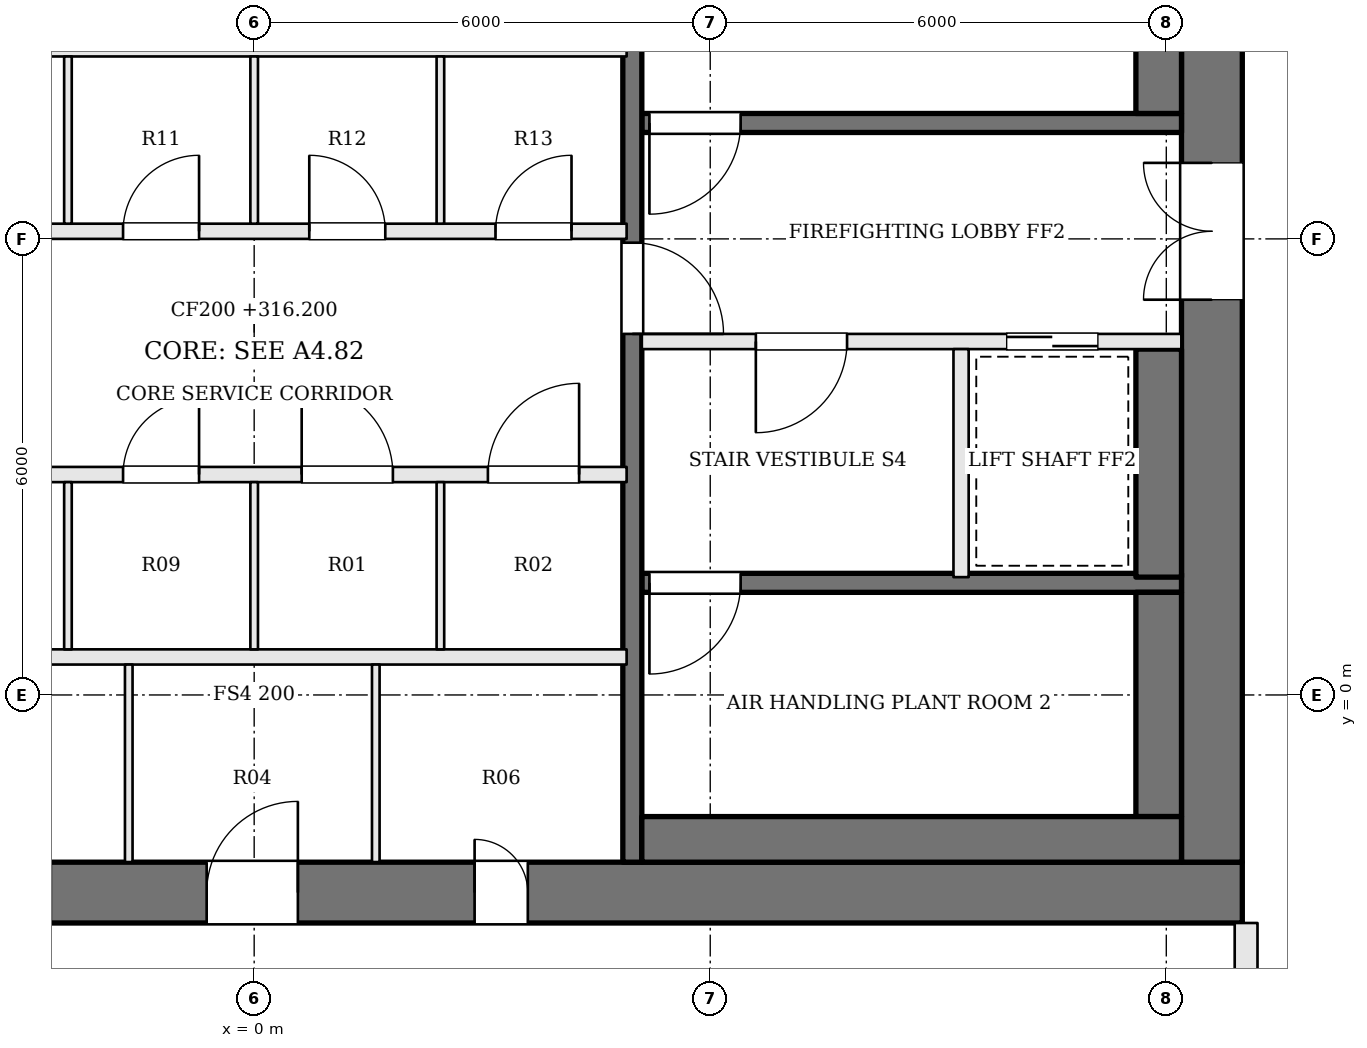
"""IFC4 building model, lengths in metres.
Left out: names, types, materials, properties, quantities, classifications, styles, units other than length and angle.
Written with IfcOpenShell. Run it as: python <this file> out.ifc"""

import sys

from ifc_helpers import new_model, si_unit, direction, frame, frame_2d, origin, place, context, subcontext, project, spatial, rectangle, extrude, element, fill, save


model = new_model("IFC4")
c1 = context("Model", 3, precision=1e-05, world=origin(), true_north=direction((0.0, 1.0)))
c2 = subcontext(c1, "Body", "Model", "MODEL_VIEW")
j1 = project(units=[si_unit("LENGTHUNIT", "METRE"), si_unit("PLANEANGLEUNIT", "RADIAN")], contexts=[c1])
p1 = place(None, origin())
s1 = spatial("IfcSite", under=j1, at=p1, CompositionType="ELEMENT")
p2 = place(p1, origin())
s2 = spatial("IfcBuilding", under=s1, at=p2, CompositionType="ELEMENT")
p3 = place(p2, frame((0.0, 0.0, 316.2)))
s3 = spatial("IfcBuildingStorey", under=s2, at=p3, CompositionType="ELEMENT", Elevation=316.2)
p4 = place(p3, frame((-13.0, -2.6, 0.0), z_axis=(0.0, 0.0, 1.0), x_axis=(1.0, 0.0, 0.0)))
e1 = element("IfcWall", 1, at=p4, inside=s3, PredefinedType="SHEAR", context=c2, shape_type="SweptSolid", body=[
    extrude(rectangle(XDim=26.0, YDim=0.8, at=frame_2d((13.0, 0.0))), origin(), (0.0, 0.0, 1.0), 4.0),
])
p5 = place(p4, frame((9.125, 0.0, 0.0)))
e2 = element("IfcOpeningElement", 2, at=p5, cuts=e1, PredefinedType="OPENING", context=c2, shape_type="SweptSolid", body=[
    extrude(rectangle(XDim=1.2, YDim=2.1, at=frame_2d((0.6, 1.05))), frame((0.0, 0.41, 0.0), z_axis=(0.0, -1.0, 0.0), x_axis=(1.0, 0.0, 0.0)), (0.0, 0.0, 1.0), 0.82),
])
p6 = place(p4, frame((12.375, 0.0, 0.0)))
e3 = element("IfcOpeningElement", 3, at=p6, cuts=e1, PredefinedType="OPENING", context=c2, shape_type="SweptSolid", body=[
    extrude(rectangle(XDim=1.2, YDim=2.1, at=frame_2d((0.6, 1.05))), frame((0.0, 0.41, 0.0), z_axis=(0.0, -1.0, 0.0), x_axis=(1.0, 0.0, 0.0)), (0.0, 0.0, 1.0), 0.82),
])
p7 = place(p4, frame((15.9, 0.0, 0.0)))
e4 = element("IfcOpeningElement", 4, at=p7, cuts=e1, PredefinedType="OPENING", context=c2, shape_type="SweptSolid", body=[
    extrude(rectangle(XDim=0.7, YDim=2.1, at=frame_2d((0.35, 1.05))), frame((0.0, 0.41, 0.0), z_axis=(0.0, -1.0, 0.0), x_axis=(1.0, 0.0, 0.0)), (0.0, 0.0, 1.0), 0.82),
])
p8 = place(p4, frame((6.7, 0.0, 0.0)))
e5 = element("IfcOpeningElement", 5, at=p8, cuts=e1, PredefinedType="OPENING", context=c2, shape_type="SweptSolid", body=[
    extrude(rectangle(XDim=0.9, YDim=2.1, at=frame_2d((0.45, 1.05))), frame((0.0, 0.41, 0.0), z_axis=(0.0, -1.0, 0.0), x_axis=(1.0, 0.0, 0.0)), (0.0, 0.0, 1.0), 0.82),
])
p9 = place(p3, frame((12.6, -2.2, 0.0), z_axis=(0.0, 0.0, 1.0), x_axis=(0.0, 1.0, 0.0)))
e6 = element("IfcWall", 6, at=p9, inside=s3, PredefinedType="SHEAR", context=c2, shape_type="SweptSolid", body=[
    extrude(rectangle(XDim=13.4, YDim=0.8, at=frame_2d((6.7, 0.0))), origin(), (0.0, 0.0, 1.0), 4.0),
])
p10 = place(p9, frame((7.4, 0.0, 0.0)))
e7 = element("IfcOpeningElement", 7, at=p10, cuts=e6, PredefinedType="OPENING", context=c2, shape_type="SweptSolid", body=[
    extrude(rectangle(XDim=1.8, YDim=2.1, at=frame_2d((0.9, 1.05))), frame((0.0, 0.41, 0.0), z_axis=(0.0, -1.0, 0.0), x_axis=(1.0, 0.0, 0.0)), (0.0, 0.0, 1.0), 0.82),
])
p11 = place(p3, frame((12.2, 7.525, 0.0), z_axis=(0.0, 0.0, 1.0), x_axis=(-1.0, 0.0, 0.0)))
e8 = element("IfcWall", 8, at=p11, inside=s3, PredefinedType="SOLIDWALL", context=c2, shape_type="SweptSolid", body=[
    extrude(rectangle(XDim=7.1, YDim=0.25, at=frame_2d((3.55, 0.0))), origin(), (0.0, 0.0, 1.0), 3.28),
])
p12 = place(p11, frame((5.8, 0.0, 0.0)))
e9 = element("IfcOpeningElement", 9, at=p12, cuts=e8, PredefinedType="OPENING", context=c2, shape_type="SweptSolid", body=[
    extrude(rectangle(XDim=1.2, YDim=2.1, at=frame_2d((0.6, 1.05))), frame((0.0, 0.135, 0.0), z_axis=(0.0, -1.0, 0.0), x_axis=(1.0, 0.0, 0.0)), (0.0, 0.0, 1.0), 0.27),
])
p13 = place(p3, frame((12.2, 4.65, 0.0), z_axis=(0.0, 0.0, 1.0), x_axis=(-1.0, 0.0, 0.0)))
e10 = element("IfcWall", 10, at=p13, inside=s3, PredefinedType="SOLIDWALL", context=c2, shape_type="SweptSolid", body=[
    extrude(rectangle(XDim=7.1, YDim=0.2, at=frame_2d((3.55, 0.0))), origin(), (0.0, 0.0, 1.0), 3.28),
])
p14 = place(p13, frame((4.4, 0.0, 0.0)))
e11 = element("IfcOpeningElement", 11, at=p14, cuts=e10, PredefinedType="OPENING", context=c2, shape_type="SweptSolid", body=[
    extrude(rectangle(XDim=1.2, YDim=2.1, at=frame_2d((0.6, 1.05))), frame((0.0, 0.11, 0.0), z_axis=(0.0, -1.0, 0.0), x_axis=(1.0, 0.0, 0.0)), (0.0, 0.0, 1.0), 0.22),
])
p15 = place(p13, frame((1.1, 0.0, 0.0)))
e12 = element("IfcOpeningElement", 12, at=p15, cuts=e10, PredefinedType="OPENING", context=c2, shape_type="SweptSolid", body=[
    extrude(rectangle(XDim=1.2, YDim=2.1, at=frame_2d((0.6, 1.05))), frame((0.0, 0.11, 0.0), z_axis=(0.0, -1.0, 0.0), x_axis=(1.0, 0.0, 0.0)), (0.0, 0.0, 1.0), 0.22),
])
p16 = place(p3, frame((12.2, 1.475, 0.0), z_axis=(0.0, 0.0, 1.0), x_axis=(-1.0, 0.0, 0.0)))
e13 = element("IfcWall", 13, at=p16, inside=s3, PredefinedType="SOLIDWALL", context=c2, shape_type="SweptSolid", body=[
    extrude(rectangle(XDim=7.1, YDim=0.25, at=frame_2d((3.55, 0.0))), origin(), (0.0, 0.0, 1.0), 3.28),
])
p17 = place(p16, frame((5.8, 0.0, 0.0)))
e14 = element("IfcOpeningElement", 14, at=p17, cuts=e13, PredefinedType="OPENING", context=c2, shape_type="SweptSolid", body=[
    extrude(rectangle(XDim=1.2, YDim=2.1, at=frame_2d((0.6, 1.05))), frame((0.0, 0.135, 0.0), z_axis=(0.0, -1.0, 0.0), x_axis=(1.0, 0.0, 0.0)), (0.0, 0.0, 1.0), 0.27),
])
p18 = place(p3, frame((9.3, 4.55, 0.0), z_axis=(0.0, 0.0, 1.0), x_axis=(0.0, -1.0, 0.0)))
e15 = element("IfcWall", 15, at=p18, inside=s3, PredefinedType="SOLIDWALL", context=c2, shape_type="SweptSolid", body=[
    extrude(rectangle(XDim=3.0, YDim=0.2, at=frame_2d((1.5, 0.0))), origin(), (0.0, 0.0, 1.0), 3.28),
])
p19 = place(p3, frame((4.975, 11.2, 0.0), z_axis=(0.0, 0.0, 1.0), x_axis=(0.0, -1.0, 0.0)))
e16 = element("IfcWall", 16, at=p19, inside=s3, PredefinedType="SOLIDWALL", context=c2, shape_type="SweptSolid", body=[
    extrude(rectangle(XDim=13.4, YDim=0.25, at=frame_2d((6.7, 0.0))), origin(), (0.0, 0.0, 1.0), 3.28),
])
p20 = place(p19, frame((5.25, 0.0, 0.0)))
e17 = element("IfcOpeningElement", 17, at=p20, cuts=e16, PredefinedType="OPENING", context=c2, shape_type="SweptSolid", body=[
    extrude(rectangle(XDim=1.2, YDim=2.1, at=frame_2d((0.6, 1.05))), frame((0.0, 0.135, 0.0), z_axis=(0.0, -1.0, 0.0), x_axis=(1.0, 0.0, 0.0)), (0.0, 0.0, 1.0), 0.27),
])
p21 = place(p3, frame((11.9, 10.6, 0.0), z_axis=(0.0, 0.0, 1.0), x_axis=(0.0, -1.0, 0.0)))
e18 = element("IfcWall", 18, at=p21, inside=s3, PredefinedType="SOLIDWALL", context=c2, shape_type="SweptSolid", body=[
    extrude(rectangle(XDim=2.95, YDim=0.6, at=frame_2d((1.475, 0.0))), origin(), (0.0, 0.0, 1.0), 3.28),
])
p22 = place(p3, frame((11.9, 4.55, 0.0), z_axis=(0.0, 0.0, 1.0), x_axis=(0.0, -1.0, 0.0)))
e19 = element("IfcWall", 19, at=p22, inside=s3, PredefinedType="SOLIDWALL", context=c2, shape_type="SweptSolid", body=[
    extrude(rectangle(XDim=3.0, YDim=0.6, at=frame_2d((1.5, 0.0))), origin(), (0.0, 0.0, 1.0), 3.28),
])
p23 = place(p3, frame((11.9, 1.35, 0.0), z_axis=(0.0, 0.0, 1.0), x_axis=(0.0, -1.0, 0.0)))
e20 = element("IfcWall", 20, at=p23, inside=s3, PredefinedType="SOLIDWALL", context=c2, shape_type="SweptSolid", body=[
    extrude(rectangle(XDim=2.95, YDim=0.6, at=frame_2d((1.475, 0.0))), origin(), (0.0, 0.0, 1.0), 3.28),
])
p24 = place(p3, frame((12.2, -1.9, 0.0), z_axis=(0.0, 0.0, 1.0), x_axis=(-1.0, 0.0, 0.0)))
e21 = element("IfcWall", 21, at=p24, inside=s3, PredefinedType="SOLIDWALL", context=c2, shape_type="SweptSolid", body=[
    extrude(rectangle(XDim=7.1, YDim=0.6, at=frame_2d((3.55, 0.0))), origin(), (0.0, 0.0, 1.0), 3.28),
])
p25 = place(p3, frame((-4.9, 0.5, 0.0), z_axis=(0.0, 0.0, 1.0), x_axis=(1.0, 0.0, 0.0)))
e22 = element("IfcWall", 22, at=p25, inside=s3, PredefinedType="SOLIDWALL", context=c2, shape_type="SweptSolid", body=[
    extrude(rectangle(XDim=9.8, YDim=0.2, at=frame_2d((4.9, 0.0))), origin(), (0.0, 0.0, 1.0), 3.28),
])
p26 = place(p3, frame((-4.9, 2.9, 0.0), z_axis=(0.0, 0.0, 1.0), x_axis=(1.0, 0.0, 0.0)))
e23 = element("IfcWall", 23, at=p26, inside=s3, PredefinedType="SOLIDWALL", context=c2, shape_type="SweptSolid", body=[
    extrude(rectangle(XDim=9.8, YDim=0.2, at=frame_2d((4.9, 0.0))), origin(), (0.0, 0.0, 1.0), 3.28),
])
p27 = place(p26, frame((0.725, 0.0, 0.0)))
e24 = element("IfcOpeningElement", 24, at=p27, cuts=e23, PredefinedType="OPENING", context=c2, shape_type="SweptSolid", body=[
    extrude(rectangle(XDim=1.0, YDim=2.1, at=frame_2d((0.5, 1.05))), frame((0.0, 0.11, 0.0), z_axis=(0.0, -1.0, 0.0), x_axis=(1.0, 0.0, 0.0)), (0.0, 0.0, 1.0), 0.22),
])
p28 = place(p26, frame((3.175, 0.0, 0.0)))
e25 = element("IfcOpeningElement", 25, at=p28, cuts=e23, PredefinedType="OPENING", context=c2, shape_type="SweptSolid", body=[
    extrude(rectangle(XDim=1.0, YDim=2.1, at=frame_2d((0.5, 1.05))), frame((0.0, 0.11, 0.0), z_axis=(0.0, -1.0, 0.0), x_axis=(1.0, 0.0, 0.0)), (0.0, 0.0, 1.0), 0.22),
])
p29 = place(p26, frame((5.525, 0.0, 0.0)))
e26 = element("IfcOpeningElement", 26, at=p29, cuts=e23, PredefinedType="OPENING", context=c2, shape_type="SweptSolid", body=[
    extrude(rectangle(XDim=1.2, YDim=2.1, at=frame_2d((0.6, 1.05))), frame((0.0, 0.11, 0.0), z_axis=(0.0, -1.0, 0.0), x_axis=(1.0, 0.0, 0.0)), (0.0, 0.0, 1.0), 0.22),
])
p30 = place(p26, frame((7.975, 0.0, 0.0)))
e27 = element("IfcOpeningElement", 27, at=p30, cuts=e23, PredefinedType="OPENING", context=c2, shape_type="SweptSolid", body=[
    extrude(rectangle(XDim=1.2, YDim=2.1, at=frame_2d((0.6, 1.05))), frame((0.0, 0.11, 0.0), z_axis=(0.0, -1.0, 0.0), x_axis=(1.0, 0.0, 0.0)), (0.0, 0.0, 1.0), 0.22),
])
p31 = place(p3, frame((-4.9, 6.1, 0.0), z_axis=(0.0, 0.0, 1.0), x_axis=(1.0, 0.0, 0.0)))
e28 = element("IfcWall", 28, at=p31, inside=s3, PredefinedType="SOLIDWALL", context=c2, shape_type="SweptSolid", body=[
    extrude(rectangle(XDim=9.8, YDim=0.2, at=frame_2d((4.9, 0.0))), origin(), (0.0, 0.0, 1.0), 3.28),
])
p32 = place(p31, frame((0.725, 0.0, 0.0)))
e29 = element("IfcOpeningElement", 29, at=p32, cuts=e28, PredefinedType="OPENING", context=c2, shape_type="SweptSolid", body=[
    extrude(rectangle(XDim=1.0, YDim=2.1, at=frame_2d((0.5, 1.05))), frame((0.0, 0.11, 0.0), z_axis=(0.0, -1.0, 0.0), x_axis=(1.0, 0.0, 0.0)), (0.0, 0.0, 1.0), 0.22),
])
p33 = place(p31, frame((3.175, 0.0, 0.0)))
e30 = element("IfcOpeningElement", 30, at=p33, cuts=e28, PredefinedType="OPENING", context=c2, shape_type="SweptSolid", body=[
    extrude(rectangle(XDim=1.0, YDim=2.1, at=frame_2d((0.5, 1.05))), frame((0.0, 0.11, 0.0), z_axis=(0.0, -1.0, 0.0), x_axis=(1.0, 0.0, 0.0)), (0.0, 0.0, 1.0), 0.22),
])
p34 = place(p31, frame((5.625, 0.0, 0.0)))
e31 = element("IfcOpeningElement", 31, at=p34, cuts=e28, PredefinedType="OPENING", context=c2, shape_type="SweptSolid", body=[
    extrude(rectangle(XDim=1.0, YDim=2.1, at=frame_2d((0.5, 1.05))), frame((0.0, 0.11, 0.0), z_axis=(0.0, -1.0, 0.0), x_axis=(1.0, 0.0, 0.0)), (0.0, 0.0, 1.0), 0.22),
])
p35 = place(p31, frame((8.075, 0.0, 0.0)))
e32 = element("IfcOpeningElement", 32, at=p35, cuts=e28, PredefinedType="OPENING", context=c2, shape_type="SweptSolid", body=[
    extrude(rectangle(XDim=1.0, YDim=2.1, at=frame_2d((0.5, 1.05))), frame((0.0, 0.11, 0.0), z_axis=(0.0, -1.0, 0.0), x_axis=(1.0, 0.0, 0.0)), (0.0, 0.0, 1.0), 0.22),
])
p36 = place(p3, frame((-4.9, 8.5, 0.0), z_axis=(0.0, 0.0, 1.0), x_axis=(1.0, 0.0, 0.0)))
e33 = element("IfcWall", 33, at=p36, inside=s3, PredefinedType="SOLIDWALL", context=c2, shape_type="SweptSolid", body=[
    extrude(rectangle(XDim=9.8, YDim=0.2, at=frame_2d((4.9, 0.0))), origin(), (0.0, 0.0, 1.0), 3.28),
])
for number, where, z_axis, x_axis in (
    (34, (-2.45, 0.6, 0.0), (0.0, 0.0, 1.0), (0.0, 1.0, 0.0)),
    (35, (0.0, 0.6, 0.0), (0.0, 0.0, 1.0), (0.0, 1.0, 0.0)),
    (36, (2.45, 0.6, 0.0), (0.0, 0.0, 1.0), (0.0, 1.0, 0.0)),
    (37, (-2.45, 6.2, 0.0), (0.0, 0.0, 1.0), (0.0, 1.0, 0.0)),
    (38, (0.0, 6.2, 0.0), (0.0, 0.0, 1.0), (0.0, 1.0, 0.0)),
    (39, (2.45, 6.2, 0.0), (0.0, 0.0, 1.0), (0.0, 1.0, 0.0)),
):
    element("IfcWall", number, at=place(p3, frame(where, z_axis=z_axis, x_axis=x_axis)), inside=s3, PredefinedType="PARTITIONING", context=c2, shape_type="SweptSolid", body=[
        extrude(rectangle(XDim=2.2, YDim=0.1, at=frame_2d((1.1, 0.0))), origin(), (0.0, 0.0, 1.0), 3.28),
    ])
for number, where, z_axis, x_axis in (
    (40, (-1.65, -2.2, 0.0), (0.0, 0.0, 1.0), (0.0, 1.0, 0.0)),
    (41, (1.6, -2.2, 0.0), (0.0, 0.0, 1.0), (0.0, 1.0, 0.0)),
):
    element("IfcWall", number, at=place(p3, frame(where, z_axis=z_axis, x_axis=x_axis)), inside=s3, PredefinedType="PARTITIONING", context=c2, shape_type="SweptSolid", body=[
        extrude(rectangle(XDim=2.6, YDim=0.1, at=frame_2d((1.3, 0.0))), origin(), (0.0, 0.0, 1.0), 3.28),
    ])
p37 = place(p3, frame((13.05, -8.0, 0.0), z_axis=(0.0, 0.0, 1.0), x_axis=(0.0, 1.0, 0.0)))
e42 = element("IfcWall", 42, at=p37, inside=s3, PredefinedType="SOLIDWALL", context=c2, shape_type="SweptSolid", body=[
    extrude(rectangle(XDim=5.0, YDim=0.3, at=frame_2d((2.5, 0.0))), origin(), (0.0, 0.0, 1.0), 3.484),
])
p38 = place(p10, origin())
e43 = element("IfcDoor", 43, at=p38, inside=s3, OperationType="DOUBLE_DOOR_SINGLE_SWING", PredefinedType="DOOR", context=c2, shape_type="SweptSolid", body=[
    extrude(rectangle(XDim=1.8, YDim=2.1, at=frame_2d((0.9, 1.05))), frame((0.0, 0.025, 0.0), z_axis=(0.0, -1.0, 0.0), x_axis=(1.0, 0.0, 0.0)), (0.0, 0.0, 1.0), 0.05),
])
fill(e7, e43)
p39 = place(p20, origin())
e44 = element("IfcDoor", 44, at=p39, inside=s3, OperationType="SINGLE_SWING_RIGHT", PredefinedType="DOOR", context=c2, shape_type="SweptSolid", body=[
    extrude(rectangle(XDim=1.2, YDim=2.1, at=frame_2d((0.6, 1.05))), frame((0.0, 0.025, 0.0), z_axis=(0.0, -1.0, 0.0), x_axis=(1.0, 0.0, 0.0)), (0.0, 0.0, 1.0), 0.05),
])
fill(e17, e44)
p40 = place(p14, origin())
e45 = element("IfcDoor", 45, at=p40, inside=s3, OperationType="SINGLE_SWING_RIGHT", PredefinedType="DOOR", context=c2, shape_type="SweptSolid", body=[
    extrude(rectangle(XDim=1.2, YDim=2.1, at=frame_2d((0.6, 1.05))), frame((0.0, 0.025, 0.0), z_axis=(0.0, -1.0, 0.0), x_axis=(1.0, 0.0, 0.0)), (0.0, 0.0, 1.0), 0.05),
])
fill(e11, e45)
p41 = place(p12, origin())
e46 = element("IfcDoor", 46, at=p41, inside=s3, OperationType="SINGLE_SWING_RIGHT", PredefinedType="DOOR", context=c2, shape_type="SweptSolid", body=[
    extrude(rectangle(XDim=1.2, YDim=2.1, at=frame_2d((0.6, 1.05))), frame((0.0, 0.025, 0.0), z_axis=(0.0, -1.0, 0.0), x_axis=(1.0, 0.0, 0.0)), (0.0, 0.0, 1.0), 0.05),
])
fill(e9, e46)
p42 = place(p17, origin())
e47 = element("IfcDoor", 47, at=p42, inside=s3, OperationType="SINGLE_SWING_RIGHT", PredefinedType="DOOR", context=c2, shape_type="SweptSolid", body=[
    extrude(rectangle(XDim=1.2, YDim=2.1, at=frame_2d((0.6, 1.05))), frame((0.0, 0.025, 0.0), z_axis=(0.0, -1.0, 0.0), x_axis=(1.0, 0.0, 0.0)), (0.0, 0.0, 1.0), 0.05),
])
fill(e14, e47)
p43 = place(p15, origin())
e48 = element("IfcDoor", 48, at=p43, inside=s3, OperationType="SLIDING_TO_RIGHT", PredefinedType="DOOR", context=c2, shape_type="SweptSolid", body=[
    extrude(rectangle(XDim=1.2, YDim=2.1, at=frame_2d((0.6, 1.05))), frame((0.0, 0.025, 0.0), z_axis=(0.0, -1.0, 0.0), x_axis=(1.0, 0.0, 0.0)), (0.0, 0.0, 1.0), 0.05),
])
fill(e12, e48)
p44 = place(p28, origin())
e49 = element("IfcDoor", 49, at=p44, inside=s3, OperationType="SINGLE_SWING_RIGHT", PredefinedType="DOOR", context=c2, shape_type="SweptSolid", body=[
    extrude(rectangle(XDim=1.0, YDim=2.1, at=frame_2d((0.5, 1.05))), frame((0.0, 0.025, 0.0), z_axis=(0.0, -1.0, 0.0), x_axis=(1.0, 0.0, 0.0)), (0.0, 0.0, 1.0), 0.05),
])
fill(e25, e49)
p45 = place(p29, origin())
e50 = element("IfcDoor", 50, at=p45, inside=s3, OperationType="SINGLE_SWING_LEFT", PredefinedType="DOOR", context=c2, shape_type="SweptSolid", body=[
    extrude(rectangle(XDim=1.2, YDim=2.1, at=frame_2d((0.6, 1.05))), frame((0.0, 0.025, 0.0), z_axis=(0.0, -1.0, 0.0), x_axis=(1.0, 0.0, 0.0)), (0.0, 0.0, 1.0), 0.05),
])
fill(e26, e50)
p46 = place(p30, origin())
e51 = element("IfcDoor", 51, at=p46, inside=s3, OperationType="SINGLE_SWING_RIGHT", PredefinedType="DOOR", context=c2, shape_type="SweptSolid", body=[
    extrude(rectangle(XDim=1.2, YDim=2.1, at=frame_2d((0.6, 1.05))), frame((0.0, 0.025, 0.0), z_axis=(0.0, -1.0, 0.0), x_axis=(1.0, 0.0, 0.0)), (0.0, 0.0, 1.0), 0.05),
])
fill(e27, e51)
p47 = place(p33, origin())
e52 = element("IfcDoor", 52, at=p47, inside=s3, OperationType="SINGLE_SWING_RIGHT", PredefinedType="DOOR", context=c2, shape_type="SweptSolid", body=[
    extrude(rectangle(XDim=1.0, YDim=2.1, at=frame_2d((0.5, 1.05))), frame((0.0, 0.025, 0.0), z_axis=(0.0, -1.0, 0.0), x_axis=(1.0, 0.0, 0.0)), (0.0, 0.0, 1.0), 0.05),
])
fill(e30, e52)
p48 = place(p34, origin())
e53 = element("IfcDoor", 53, at=p48, inside=s3, OperationType="SINGLE_SWING_LEFT", PredefinedType="DOOR", context=c2, shape_type="SweptSolid", body=[
    extrude(rectangle(XDim=1.0, YDim=2.1, at=frame_2d((0.5, 1.05))), frame((0.0, 0.025, 0.0), z_axis=(0.0, -1.0, 0.0), x_axis=(1.0, 0.0, 0.0)), (0.0, 0.0, 1.0), 0.05),
])
fill(e31, e53)
p49 = place(p35, origin())
e54 = element("IfcDoor", 54, at=p49, inside=s3, OperationType="SINGLE_SWING_RIGHT", PredefinedType="DOOR", context=c2, shape_type="SweptSolid", body=[
    extrude(rectangle(XDim=1.0, YDim=2.1, at=frame_2d((0.5, 1.05))), frame((0.0, 0.025, 0.0), z_axis=(0.0, -1.0, 0.0), x_axis=(1.0, 0.0, 0.0)), (0.0, 0.0, 1.0), 0.05),
])
fill(e32, e54)
p50 = place(p6, origin())
e55 = element("IfcDoor", 55, at=p50, inside=s3, OperationType="SINGLE_SWING_RIGHT", PredefinedType="DOOR", context=c2, shape_type="SweptSolid", body=[
    extrude(rectangle(XDim=1.2, YDim=2.1, at=frame_2d((0.6, 1.05))), frame((0.0, 0.025, 0.0), z_axis=(0.0, -1.0, 0.0), x_axis=(1.0, 0.0, 0.0)), (0.0, 0.0, 1.0), 0.05),
])
fill(e3, e55)
p51 = place(p7, origin())
e56 = element("IfcDoor", 56, at=p51, inside=s3, OperationType="SINGLE_SWING_LEFT", PredefinedType="DOOR", context=c2, shape_type="SweptSolid", body=[
    extrude(rectangle(XDim=0.7, YDim=2.1, at=frame_2d((0.35, 1.05))), frame((0.0, 0.025, 0.0), z_axis=(0.0, -1.0, 0.0), x_axis=(1.0, 0.0, 0.0)), (0.0, 0.0, 1.0), 0.05),
])
fill(e4, e56)
save(model, sys.argv[1])
